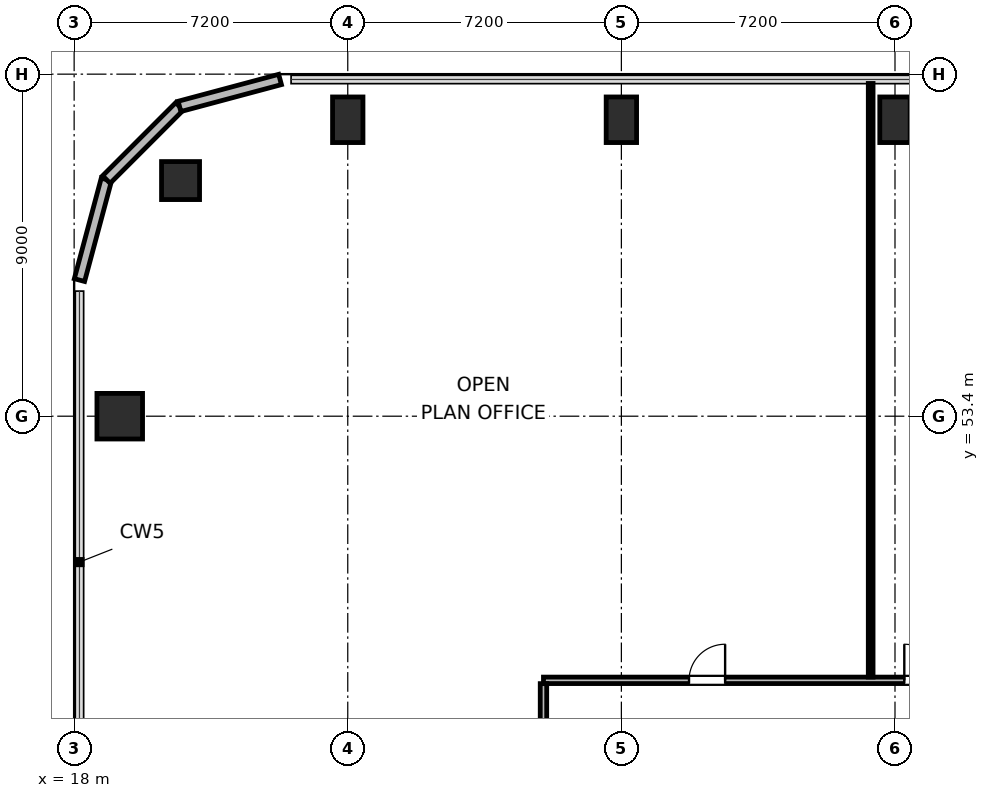
"""IFC4 building model, lengths in metres.
Left out: names, types, materials, properties, quantities, classifications, styles, units other than length and angle.
Written with IfcOpenShell. Run it as: python <this file> out.ifc"""

import sys

from ifc_helpers import new_model, si_unit, direction, frame, frame_2d, origin, origin_2d, place, context, subcontext, project, spatial, rectangle, circle, extrude, element, fill, save


model = new_model("IFC4")
c1 = context("Model", 3, precision=1e-05, world=origin(), true_north=direction((0.0, 1.0)))
c2 = subcontext(c1, "Body", "Model", "MODEL_VIEW")
j1 = project(units=[si_unit("LENGTHUNIT", "METRE"), si_unit("PLANEANGLEUNIT", "RADIAN")], contexts=[c1])
p1 = place(None, origin())
s1 = spatial("IfcSite", under=j1, at=p1, CompositionType="ELEMENT")
p2 = place(p1, origin())
s2 = spatial("IfcBuilding", under=s1, at=p2, CompositionType="ELEMENT")
p3 = place(p2, frame((0.0, 0.0, 181.8)))
s3 = spatial("IfcBuildingStorey", under=s2, at=p3, CompositionType="ELEMENT", Elevation=181.8)
p4 = place(p3, frame((20.8, 59.6, 0.0), z_axis=(0.0, 0.0, 1.0), x_axis=(1.0, 0.0, 0.0)))
e1 = element("IfcColumn", 1, at=p4, inside=s3, PredefinedType="COLUMN", context=c2, shape_type="SweptSolid", body=[
    extrude(circle(Radius=0.5, at=origin_2d()), origin(), (0.0, 0.0, 1.0), 4.5),
])
for number, where, z_axis, x_axis in (
    (2, (25.2, 61.2, 0.0), (0.0, 0.0, 1.0), (1.0, 0.0, 0.0)),
    (3, (32.4, 61.2, 0.0), (0.0, 0.0, 1.0), (1.0, 0.0, 0.0)),
    (4, (39.6, 61.2, 0.0), (0.0, 0.0, 1.0), (1.0, 0.0, 0.0)),
):
    element("IfcColumn", number, at=place(p3, frame(where, z_axis=z_axis, x_axis=x_axis)), inside=s3, PredefinedType="COLUMN", context=c2, shape_type="SweptSolid", body=[
        extrude(rectangle(XDim=0.8, YDim=1.2, at=origin_2d()), origin(), (0.0, 0.0, 1.0), 4.5),
    ])
p5 = place(p3, frame((19.2, 53.4, 0.0), z_axis=(0.0, 0.0, 1.0), x_axis=(1.0, 0.0, 0.0)))
e5 = element("IfcColumn", 5, at=p5, inside=s3, PredefinedType="COLUMN", context=c2, shape_type="SweptSolid", body=[
    extrude(rectangle(XDim=1.2, YDim=1.2, at=origin_2d()), origin(), (0.0, 0.0, 1.0), 4.5),
])
p6 = place(p3, frame((18.14, 56.982, 0.0), z_axis=(0.0, 0.0, 1.0), x_axis=(0.258672222976, 0.9659651552, 0.0)))
e6 = element("IfcWall", 6, at=p6, inside=s3, PredefinedType="SOLIDWALL", context=c2, shape_type="SweptSolid", body=[
    extrude(rectangle(XDim=2.739, YDim=0.28, at=frame_2d((1.37, 0.0))), origin(), (0.0, 0.0, 1.0), 4.28),
])
p7 = place(p3, frame((18.848, 59.627, 0.0), z_axis=(0.0, 0.0, 1.0), x_axis=(0.707106781187, 0.707106781187, 0.0)))
e7 = element("IfcWall", 7, at=p7, inside=s3, PredefinedType="SOLIDWALL", context=c2, shape_type="SweptSolid", body=[
    extrude(rectangle(XDim=2.721, YDim=0.28, at=frame_2d((1.36, 0.0))), origin(), (0.0, 0.0, 1.0), 4.28),
])
p8 = place(p3, frame((20.772, 61.552, 0.0), z_axis=(0.0, 0.0, 1.0), x_axis=(0.965971118627, 0.258649952598, 0.0)))
e8 = element("IfcWall", 8, at=p8, inside=s3, PredefinedType="SOLIDWALL", context=c2, shape_type="SweptSolid", body=[
    extrude(rectangle(XDim=2.739, YDim=0.28, at=frame_2d((1.37, 0.0))), origin(), (0.0, 0.0, 1.0), 4.28),
])
p9 = place(p3, frame((30.35, 46.45, 0.0), z_axis=(0.0, 0.0, 1.0), x_axis=(1.0, 0.0, 0.0)))
e9 = element("IfcWall", 9, at=p9, inside=s3, PredefinedType="PARTITIONING", context=c2, shape_type="SweptSolid", body=[
    extrude(rectangle(XDim=33.25, YDim=0.17, at=frame_2d((16.625, 0.0))), origin(), (0.0, 0.0, 1.0), 4.28),
])
p10 = place(p9, frame((3.83, 0.0, 0.0)))
e10 = element("IfcOpeningElement", 10, at=p10, cuts=e9, PredefinedType="OPENING", context=c2, shape_type="SweptSolid", body=[
    extrude(rectangle(XDim=0.95, YDim=2.04, at=frame_2d((0.475, 1.02))), frame((0.0, 0.095, 0.0), z_axis=(0.0, -1.0, 0.0), x_axis=(1.0, 0.0, 0.0)), (0.0, 0.0, 1.0), 0.19),
])
p11 = place(p9, frame((9.495, 0.0, 0.0)))
e11 = element("IfcOpeningElement", 11, at=p11, cuts=e9, PredefinedType="OPENING", context=c2, shape_type="SweptSolid", body=[
    extrude(rectangle(XDim=0.95, YDim=2.04, at=frame_2d((0.475, 1.02))), frame((0.0, 0.095, 0.0), z_axis=(0.0, -1.0, 0.0), x_axis=(1.0, 0.0, 0.0)), (0.0, 0.0, 1.0), 0.19),
])
p12 = place(p9, frame((14.915, 0.0, 0.0)))
e12 = element("IfcOpeningElement", 12, at=p12, cuts=e9, PredefinedType="OPENING", context=c2, shape_type="SweptSolid", body=[
    extrude(rectangle(XDim=0.95, YDim=2.04, at=frame_2d((0.475, 1.02))), frame((0.0, 0.095, 0.0), z_axis=(0.0, -1.0, 0.0), x_axis=(1.0, 0.0, 0.0)), (0.0, 0.0, 1.0), 0.19),
])
p13 = place(p9, frame((21.945, 0.0, 0.0)))
e13 = element("IfcOpeningElement", 13, at=p13, cuts=e9, PredefinedType="OPENING", context=c2, shape_type="SweptSolid", body=[
    extrude(rectangle(XDim=0.95, YDim=2.04, at=frame_2d((0.475, 1.02))), frame((0.0, 0.095, 0.0), z_axis=(0.0, -1.0, 0.0), x_axis=(1.0, 0.0, 0.0)), (0.0, 0.0, 1.0), 0.19),
])
p14 = place(p9, frame((28.845, 0.0, 0.0)))
e14 = element("IfcOpeningElement", 14, at=p14, cuts=e9, PredefinedType="OPENING", context=c2, shape_type="SweptSolid", body=[
    extrude(rectangle(XDim=0.95, YDim=2.04, at=frame_2d((0.475, 1.02))), frame((0.0, 0.095, 0.0), z_axis=(0.0, -1.0, 0.0), x_axis=(1.0, 0.0, 0.0)), (0.0, 0.0, 1.0), 0.19),
])
p15 = place(p3, frame((30.35, 37.1, 0.0), z_axis=(0.0, 0.0, 1.0), x_axis=(0.0, 1.0, 0.0)))
e15 = element("IfcWall", 15, at=p15, inside=s3, PredefinedType="PARTITIONING", context=c2, shape_type="SweptSolid", body=[
    extrude(rectangle(XDim=9.263, YDim=0.17, at=frame_2d((4.631, 0.0))), origin(), (0.0, 0.0, 1.0), 4.28),
])
p16 = place(p15, frame((4.2, 0.0, 0.0)))
e16 = element("IfcOpeningElement", 16, at=p16, cuts=e15, PredefinedType="OPENING", context=c2, shape_type="SweptSolid", body=[
    extrude(rectangle(XDim=0.95, YDim=2.04, at=frame_2d((0.475, 1.02))), frame((0.0, 0.095, 0.0), z_axis=(0.0, -1.0, 0.0), x_axis=(1.0, 0.0, 0.0)), (0.0, 0.0, 1.0), 0.19),
])
p17 = place(p3, frame((38.96, 46.537, 0.0), z_axis=(0.0, 0.0, 1.0), x_axis=(0.0, 1.0, 0.0)))
e17 = element("IfcWall", 17, at=p17, inside=s3, PredefinedType="PARTITIONING", context=c2, shape_type="SweptSolid", body=[
    extrude(rectangle(XDim=15.618, YDim=0.125, at=frame_2d((7.809, 0.0))), origin(), (0.0, 0.0, 1.0), 4.28),
])
p18 = place(p10, origin())
e18 = element("IfcDoor", 18, at=p18, inside=s3, OperationType="SINGLE_SWING_RIGHT", PredefinedType="DOOR", context=c2, shape_type="SweptSolid", body=[
    extrude(rectangle(XDim=0.95, YDim=2.04, at=frame_2d((0.475, 1.02))), frame((0.0, 0.025, 0.0), z_axis=(0.0, -1.0, 0.0), x_axis=(1.0, 0.0, 0.0)), (0.0, 0.0, 1.0), 0.05),
])
fill(e10, e18)
p19 = place(p11, origin())
e19 = element("IfcDoor", 19, at=p19, inside=s3, OperationType="SINGLE_SWING_LEFT", PredefinedType="DOOR", context=c2, shape_type="SweptSolid", body=[
    extrude(rectangle(XDim=0.95, YDim=2.04, at=frame_2d((0.475, 1.02))), frame((0.0, 0.025, 0.0), z_axis=(0.0, -1.0, 0.0), x_axis=(1.0, 0.0, 0.0)), (0.0, 0.0, 1.0), 0.05),
])
fill(e11, e19)
save(model, sys.argv[1])
